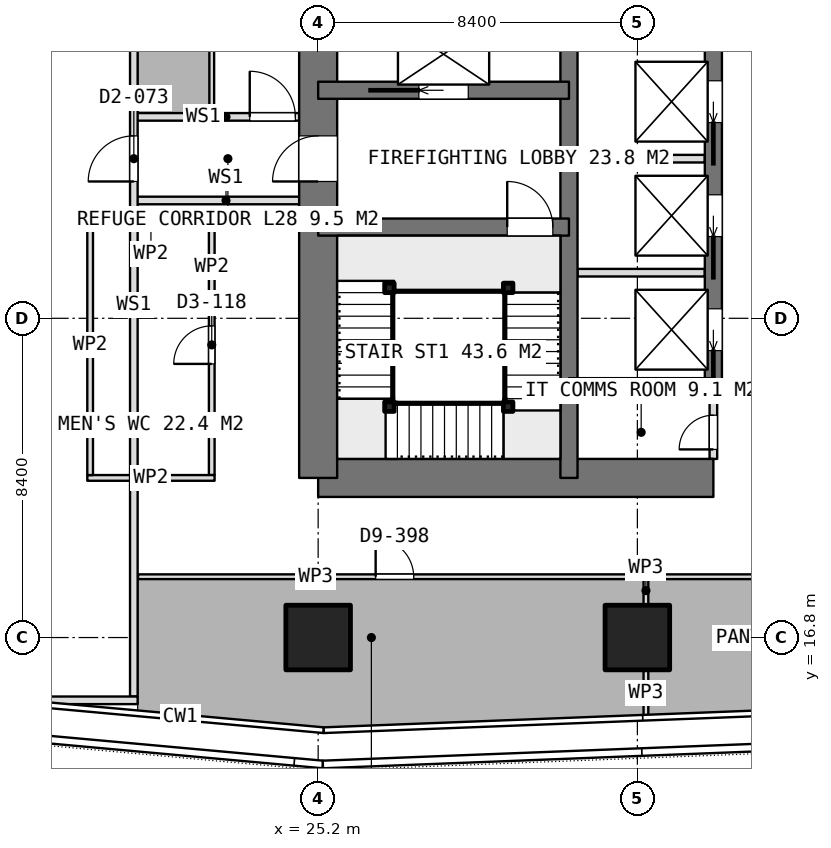
"""IFC4 building model, lengths in metres.
Left out: names, types, materials, properties, quantities, classifications, styles, units other than length and angle.
Written with IfcOpenShell. Run it as: python <this file> out.ifc"""

import sys

from ifc_helpers import new_model, si_unit, direction, frame, frame_2d, origin, origin_2d, place, context, subcontext, project, spatial, rectangle, extrude, element, fill, save


model = new_model("IFC4")
c1 = context("Model", 3, precision=1e-05, world=origin(), true_north=direction((0.0, 1.0)))
c2 = subcontext(c1, "Body", "Model", "MODEL_VIEW")
j1 = project(units=[si_unit("LENGTHUNIT", "METRE"), si_unit("PLANEANGLEUNIT", "RADIAN")], contexts=[c1])
p1 = place(None, origin())
s1 = spatial("IfcSite", under=j1, at=p1, CompositionType="ELEMENT")
p2 = place(p1, origin())
s2 = spatial("IfcBuilding", under=s1, at=p2, CompositionType="ELEMENT")
p3 = place(p2, frame((0.0, 0.0, 114.05)))
s3 = spatial("IfcBuildingStorey", under=s2, at=p3, CompositionType="ELEMENT", Elevation=114.05)
p4 = place(p3, frame((25.2, 21.0, 0.0), z_axis=(0.0, 0.0, 1.0), x_axis=(1.0, 0.0, 0.0)))
e1 = element("IfcWall", 1, at=p4, inside=s3, PredefinedType="SHEAR", context=c2, shape_type="SweptSolid", body=[
    extrude(rectangle(XDim=10.4, YDim=1.0, at=frame_2d((5.2, 0.0))), origin(), (0.0, 0.0, 1.0), 3.75),
])
p5 = place(p3, frame((25.2, 21.0, 0.0), z_axis=(0.0, 0.0, 1.0), x_axis=(0.0, 1.0, 0.0)))
e2 = element("IfcWall", 2, at=p5, inside=s3, PredefinedType="SHEAR", context=c2, shape_type="SweptSolid", body=[
    extrude(rectangle(XDim=25.2, YDim=1.0, at=frame_2d((12.6, 0.0))), origin(), (0.0, 0.0, 1.0), 3.75),
])
p6 = place(p5, frame((7.8, 0.0, 0.0)))
e3 = element("IfcOpeningElement", 3, at=p6, cuts=e2, PredefinedType="OPENING", context=c2, shape_type="SweptSolid", body=[
    extrude(rectangle(XDim=1.2, YDim=2.1, at=frame_2d((0.6, 1.05))), frame((0.0, 0.51, 0.0), z_axis=(0.0, -1.0, 0.0), x_axis=(1.0, 0.0, 0.0)), (0.0, 0.0, 1.0), 1.02),
])
p7 = place(p5, frame((14.25, 0.0, 0.0)))
e4 = element("IfcOpeningElement", 4, at=p7, cuts=e2, PredefinedType="OPENING", context=c2, shape_type="SweptSolid", body=[
    extrude(rectangle(XDim=0.9, YDim=2.1, at=frame_2d((0.45, 1.05))), frame((0.0, 0.51, 0.0), z_axis=(0.0, -1.0, 0.0), x_axis=(1.0, 0.0, 0.0)), (0.0, 0.0, 1.0), 1.02),
])
p8 = place(p5, frame((16.85, 0.0, 0.0)))
e5 = element("IfcOpeningElement", 5, at=p8, cuts=e2, PredefinedType="OPENING", context=c2, shape_type="SweptSolid", body=[
    extrude(rectangle(XDim=0.9, YDim=2.1, at=frame_2d((0.45, 1.05))), frame((0.0, 0.51, 0.0), z_axis=(0.0, -1.0, 0.0), x_axis=(1.0, 0.0, 0.0)), (0.0, 0.0, 1.0), 1.02),
])
p9 = place(p5, frame((19.025, 0.0, 0.0)))
e6 = element("IfcOpeningElement", 6, at=p9, cuts=e2, PredefinedType="OPENING", context=c2, shape_type="SweptSolid", body=[
    extrude(rectangle(XDim=1.2, YDim=2.1, at=frame_2d((0.6, 1.05))), frame((0.0, 0.51, 0.0), z_axis=(0.0, -1.0, 0.0), x_axis=(1.0, 0.0, 0.0)), (0.0, 0.0, 1.0), 1.02),
])
p10 = place(p3, frame((31.8, 21.0, 0.0), z_axis=(0.0, 0.0, 1.0), x_axis=(0.0, 1.0, 0.0)))
e7 = element("IfcWall", 7, at=p10, inside=s3, PredefinedType="SHEAR", context=c2, shape_type="SweptSolid", body=[
    extrude(rectangle(XDim=25.2, YDim=0.45, at=frame_2d((12.6, 0.0))), origin(), (0.0, 0.0, 1.0), 3.75),
])
p11 = place(p3, frame((35.6, 23.4, 0.0), z_axis=(0.0, 0.0, 1.0), x_axis=(0.0, 1.0, 0.0)))
e8 = element("IfcWall", 8, at=p11, inside=s3, PredefinedType="SHEAR", context=c2, shape_type="SweptSolid", body=[
    extrude(rectangle(XDim=18.0, YDim=0.45, at=frame_2d((9.0, 0.0))), origin(), (0.0, 0.0, 1.0), 3.75),
])
p12 = place(p11, frame((0.95, 0.0, 0.0)))
e9 = element("IfcOpeningElement", 9, at=p12, cuts=e8, PredefinedType="OPENING", context=c2, shape_type="SweptSolid", body=[
    extrude(rectangle(XDim=1.1, YDim=2.1, at=frame_2d((0.55, 1.05))), frame((0.0, 0.235, 0.0), z_axis=(0.0, -1.0, 0.0), x_axis=(1.0, 0.0, 0.0)), (0.0, 0.0, 1.0), 0.47),
])
p13 = place(p11, frame((3.95, 0.0, 0.0)))
e10 = element("IfcOpeningElement", 10, at=p13, cuts=e8, PredefinedType="OPENING", context=c2, shape_type="SweptSolid", body=[
    extrude(rectangle(XDim=1.1, YDim=2.1, at=frame_2d((0.55, 1.05))), frame((0.0, 0.235, 0.0), z_axis=(0.0, -1.0, 0.0), x_axis=(1.0, 0.0, 0.0)), (0.0, 0.0, 1.0), 0.47),
])
p14 = place(p11, frame((6.95, 0.0, 0.0)))
e11 = element("IfcOpeningElement", 11, at=p14, cuts=e8, PredefinedType="OPENING", context=c2, shape_type="SweptSolid", body=[
    extrude(rectangle(XDim=1.1, YDim=2.1, at=frame_2d((0.55, 1.05))), frame((0.0, 0.235, 0.0), z_axis=(0.0, -1.0, 0.0), x_axis=(1.0, 0.0, 0.0)), (0.0, 0.0, 1.0), 0.47),
])
p15 = place(p11, frame((9.95, 0.0, 0.0)))
e12 = element("IfcOpeningElement", 12, at=p15, cuts=e8, PredefinedType="OPENING", context=c2, shape_type="SweptSolid", body=[
    extrude(rectangle(XDim=1.1, YDim=2.1, at=frame_2d((0.55, 1.05))), frame((0.0, 0.235, 0.0), z_axis=(0.0, -1.0, 0.0), x_axis=(1.0, 0.0, 0.0)), (0.0, 0.0, 1.0), 0.47),
])
p16 = place(p11, frame((12.95, 0.0, 0.0)))
e13 = element("IfcOpeningElement", 13, at=p16, cuts=e8, PredefinedType="OPENING", context=c2, shape_type="SweptSolid", body=[
    extrude(rectangle(XDim=1.1, YDim=2.1, at=frame_2d((0.55, 1.05))), frame((0.0, 0.235, 0.0), z_axis=(0.0, -1.0, 0.0), x_axis=(1.0, 0.0, 0.0)), (0.0, 0.0, 1.0), 0.47),
])
p17 = place(p11, frame((15.95, 0.0, 0.0)))
e14 = element("IfcOpeningElement", 14, at=p17, cuts=e8, PredefinedType="OPENING", context=c2, shape_type="SweptSolid", body=[
    extrude(rectangle(XDim=1.1, YDim=2.1, at=frame_2d((0.55, 1.05))), frame((0.0, 0.235, 0.0), z_axis=(0.0, -1.0, 0.0), x_axis=(1.0, 0.0, 0.0)), (0.0, 0.0, 1.0), 0.47),
])
p18 = place(p3, frame((31.8, 23.4, 0.0), z_axis=(0.0, 0.0, 1.0), x_axis=(1.0, 0.0, 0.0)))
e15 = element("IfcWall", 15, at=p18, inside=s3, PredefinedType="SHEAR", context=c2, shape_type="SweptSolid", body=[
    extrude(rectangle(XDim=3.8, YDim=0.45, at=frame_2d((1.9, 0.0))), origin(), (0.0, 0.0, 1.0), 3.75),
])
p19 = place(p3, frame((25.2, 27.6, 0.0), z_axis=(0.0, 0.0, 1.0), x_axis=(1.0, 0.0, 0.0)))
e16 = element("IfcWall", 16, at=p19, inside=s3, PredefinedType="SHEAR", context=c2, shape_type="SweptSolid", body=[
    extrude(rectangle(XDim=6.6, YDim=0.45, at=frame_2d((3.3, 0.0))), origin(), (0.0, 0.0, 1.0), 3.75),
])
p20 = place(p19, frame((4.975, 0.0, 0.0)))
e17 = element("IfcOpeningElement", 17, at=p20, cuts=e16, PredefinedType="OPENING", context=c2, shape_type="SweptSolid", body=[
    extrude(rectangle(XDim=1.2, YDim=2.1, at=frame_2d((0.6, 1.05))), frame((0.0, 0.235, 0.0), z_axis=(0.0, -1.0, 0.0), x_axis=(1.0, 0.0, 0.0)), (0.0, 0.0, 1.0), 0.47),
])
p21 = place(p3, frame((25.2, 31.2, 0.0), z_axis=(0.0, 0.0, 1.0), x_axis=(1.0, 0.0, 0.0)))
e18 = element("IfcWall", 18, at=p21, inside=s3, PredefinedType="SHEAR", context=c2, shape_type="SweptSolid", body=[
    extrude(rectangle(XDim=6.6, YDim=0.45, at=frame_2d((3.3, 0.0))), origin(), (0.0, 0.0, 1.0), 3.75),
])
p22 = place(p21, frame((2.65, 0.0, 0.0)))
e19 = element("IfcOpeningElement", 19, at=p22, cuts=e18, PredefinedType="OPENING", context=c2, shape_type="SweptSolid", body=[
    extrude(rectangle(XDim=1.3, YDim=2.1, at=frame_2d((0.65, 1.05))), frame((0.0, 0.235, 0.0), z_axis=(0.0, -1.0, 0.0), x_axis=(1.0, 0.0, 0.0)), (0.0, 0.0, 1.0), 0.47),
])
for number, where, z_axis, x_axis in (
    (20, (25.2, 16.8, 0.0), (0.0, 0.0, 1.0), (1.0, 0.0, 0.0)),
    (21, (33.6, 16.8, 0.0), (0.0, 0.0, 1.0), (1.0, 0.0, 0.0)),
):
    element("IfcColumn", number, at=place(p3, frame(where, z_axis=z_axis, x_axis=x_axis)), inside=s3, PredefinedType="COLUMN", context=c2, shape_type="SweptSolid", body=[
        extrude(rectangle(XDim=1.7, YDim=1.7, at=origin_2d()), origin(), (0.0, 0.0, 1.0), 3.75),
    ])
for number, where, z_axis, x_axis in (
    (22, (32.025, 26.4, 0.0), (0.0, 0.0, 1.0), (1.0, 0.0, 0.0)),
    (23, (32.025, 29.4, 0.0), (0.0, 0.0, 1.0), (1.0, 0.0, 0.0)),
):
    element("IfcWall", number, at=place(p3, frame(where, z_axis=z_axis, x_axis=x_axis)), inside=s3, PredefinedType="PARTITIONING", context=c2, shape_type="SweptSolid", body=[
        extrude(rectangle(XDim=3.35, YDim=0.2, at=frame_2d((1.675, 0.0))), origin(), (0.0, 0.0, 1.0), 3.5),
    ])
p23 = place(p3, frame((35.6, 21.5, 0.0), z_axis=(0.0, 0.0, 1.0), x_axis=(0.0, 1.0, 0.0)))
e24 = element("IfcWall", 24, at=p23, inside=s3, PredefinedType="PARTITIONING", context=c2, shape_type="SweptSolid", body=[
    extrude(rectangle(XDim=1.675, YDim=0.2, at=frame_2d((0.837, 0.0))), origin(), (0.0, 0.0, 1.0), 3.5),
])
p24 = place(p23, frame((0.25, 0.0, 0.0)))
e25 = element("IfcOpeningElement", 25, at=p24, cuts=e24, PredefinedType="OPENING", context=c2, shape_type="SweptSolid", body=[
    extrude(rectangle(XDim=0.9, YDim=2.1, at=frame_2d((0.45, 1.05))), frame((0.0, 0.11, 0.0), z_axis=(0.0, -1.0, 0.0), x_axis=(1.0, 0.0, 0.0)), (0.0, 0.0, 1.0), 0.22),
])
for number, where, z_axis, x_axis in (
    (26, (19.125, 21.0, 0.0), (0.0, 0.0, 1.0), (1.0, 0.0, 0.0)),
    (27, (19.125, 28.0, 0.0), (0.0, 0.0, 1.0), (1.0, 0.0, 0.0)),
):
    element("IfcWall", number, at=place(p3, frame(where, z_axis=z_axis, x_axis=x_axis)), inside=s3, PredefinedType="PARTITIONING", context=c2, shape_type="SweptSolid", body=[
        extrude(rectangle(XDim=3.35, YDim=0.15, at=frame_2d((1.675, 0.0))), origin(), (0.0, 0.0, 1.0), 3.5),
    ])
p25 = place(p3, frame((19.2, 21.075, 0.0), z_axis=(0.0, 0.0, 1.0), x_axis=(0.0, 1.0, 0.0)))
e28 = element("IfcWall", 28, at=p25, inside=s3, PredefinedType="PARTITIONING", context=c2, shape_type="SweptSolid", body=[
    extrude(rectangle(XDim=6.85, YDim=0.15, at=frame_2d((3.425, 0.0))), origin(), (0.0, 0.0, 1.0), 3.5),
])
p26 = place(p3, frame((22.4, 21.075, 0.0), z_axis=(0.0, 0.0, 1.0), x_axis=(0.0, 1.0, 0.0)))
e29 = element("IfcWall", 29, at=p26, inside=s3, PredefinedType="PARTITIONING", context=c2, shape_type="SweptSolid", body=[
    extrude(rectangle(XDim=6.85, YDim=0.15, at=frame_2d((3.425, 0.0))), origin(), (0.0, 0.0, 1.0), 3.5),
])
p27 = place(p26, frame((2.925, 0.0, 0.0)))
e30 = element("IfcOpeningElement", 30, at=p27, cuts=e29, PredefinedType="OPENING", context=c2, shape_type="SweptSolid", body=[
    extrude(rectangle(XDim=1.0, YDim=2.1, at=frame_2d((0.5, 1.05))), frame((0.0, 0.085, 0.0), z_axis=(0.0, -1.0, 0.0), x_axis=(1.0, 0.0, 0.0)), (0.0, 0.0, 1.0), 0.17),
])
p28 = place(p3, frame((22.4, 40.844, 0.0), z_axis=(0.0, 0.0, 1.0), x_axis=(0.0, -1.0, 0.0)))
e31 = element("IfcWall", 31, at=p28, inside=s3, PredefinedType="PARTITIONING", context=c2, shape_type="SweptSolid", body=[
    extrude(rectangle(XDim=10.233, YDim=0.125, at=frame_2d((5.116, 0.0))), origin(), (0.0, 0.0, 1.0), 3.5),
])
p29 = place(p3, frame((20.461, 18.4, 0.0), z_axis=(0.0, 0.0, 1.0), x_axis=(1.0, 0.0, 0.0)))
e32 = element("IfcWall", 32, at=p29, inside=s3, PredefinedType="PARTITIONING", context=c2, shape_type="SweptSolid", body=[
    extrude(rectangle(XDim=13.364, YDim=0.125, at=frame_2d((6.682, 0.0))), origin(), (0.0, 0.0, 1.0), 3.5),
])
p30 = place(p29, frame((6.252, 0.0, 0.0)))
e33 = element("IfcOpeningElement", 33, at=p30, cuts=e32, PredefinedType="OPENING", context=c2, shape_type="SweptSolid", body=[
    extrude(rectangle(XDim=1.0, YDim=2.1, at=frame_2d((0.5, 1.05))), frame((0.0, 0.073, 0.0), z_axis=(0.0, -1.0, 0.0), x_axis=(1.0, 0.0, 0.0)), (0.0, 0.0, 1.0), 0.145),
])
p31 = place(p3, frame((33.825, 18.4, 0.0), z_axis=(0.0, 0.0, 1.0), x_axis=(0.0, -1.0, 0.0)))
e34 = element("IfcWall", 34, at=p31, inside=s3, PredefinedType="PARTITIONING", context=c2, shape_type="SweptSolid", body=[
    extrude(rectangle(XDim=0.73, YDim=0.125, at=frame_2d((0.365, 0.0))), origin(), (0.0, 0.0, 1.0), 3.5),
])
p32 = place(p3, frame((33.825, 15.93, 0.0), z_axis=(0.0, 0.0, 1.0), x_axis=(0.0, -1.0, 0.0)))
e35 = element("IfcWall", 35, at=p32, inside=s3, PredefinedType="PARTITIONING", context=c2, shape_type="SweptSolid", body=[
    extrude(rectangle(XDim=1.188, YDim=0.125, at=frame_2d((0.594, 0.0))), origin(), (0.0, 0.0, 1.0), 3.5),
])
p33 = place(p3, frame((33.826, 18.4, 0.0), z_axis=(0.0, 0.0, 1.0), x_axis=(1.0, 0.0, 0.0)))
e36 = element("IfcWall", 36, at=p33, inside=s3, PredefinedType="PARTITIONING", context=c2, shape_type="SweptSolid", body=[
    extrude(rectangle(XDim=7.914, YDim=0.125, at=frame_2d((3.957, 0.0))), origin(), (0.0, 0.0, 1.0), 3.5),
])
p34 = place(p33, frame((3.457, 0.0, 0.0)))
e37 = element("IfcOpeningElement", 37, at=p34, cuts=e36, PredefinedType="OPENING", context=c2, shape_type="SweptSolid", body=[
    extrude(rectangle(XDim=1.0, YDim=2.1, at=frame_2d((0.5, 1.05))), frame((0.0, 0.073, 0.0), z_axis=(0.0, -1.0, 0.0), x_axis=(1.0, 0.0, 0.0)), (0.0, 0.0, 1.0), 0.145),
])
for number, where, z_axis, x_axis in (
    (38, (30.2, 26.0, 0.0), (0.0, 0.0, 1.0), (1.0, 0.0, 0.0)),
    (39, (30.2, 22.875, 0.0), (0.0, 0.0, 1.0), (1.0, 0.0, 0.0)),
    (40, (27.075, 22.875, 0.0), (0.0, 0.0, 1.0), (1.0, 0.0, 0.0)),
    (41, (27.075, 26.0, 0.0), (0.0, 0.0, 1.0), (1.0, 0.0, 0.0)),
):
    element("IfcColumn", number, at=place(p3, frame(where, z_axis=z_axis, x_axis=x_axis)), inside=s3, PredefinedType="COLUMN", context=c2, shape_type="SweptSolid", body=[
        extrude(rectangle(XDim=0.25, YDim=0.25, at=origin_2d()), origin(), (0.0, 0.0, 1.0), 3.75),
    ])
p35 = place(p3, frame((20.35, 15.248, 0.0), z_axis=(0.0, 0.0, 1.0), x_axis=(0.0, 1.0, 0.0)))
e42 = element("IfcWall", 42, at=p35, inside=s3, PredefinedType="PARTITIONING", context=c2, shape_type="SweptSolid", body=[
    extrude(rectangle(XDim=20.595, YDim=0.2, at=frame_2d((10.297, 0.0))), origin(), (0.0, 0.0, 1.0), 3.5),
])
p36 = place(p35, frame((13.552, 0.0, 0.0)))
e43 = element("IfcOpeningElement", 43, at=p36, cuts=e42, PredefinedType="OPENING", context=c2, shape_type="SweptSolid", body=[
    extrude(rectangle(XDim=1.2, YDim=2.1, at=frame_2d((0.6, 1.05))), frame((0.0, 0.11, 0.0), z_axis=(0.0, -1.0, 0.0), x_axis=(1.0, 0.0, 0.0)), (0.0, 0.0, 1.0), 0.22),
])
p37 = place(p3, frame((6.679, 15.148, 0.0), z_axis=(0.0, 0.0, 1.0), x_axis=(1.0, 0.0, 0.0)))
e44 = element("IfcWall", 44, at=p37, inside=s3, PredefinedType="PARTITIONING", context=c2, shape_type="SweptSolid", body=[
    extrude(rectangle(XDim=13.771, YDim=0.2, at=frame_2d((6.885, 0.0))), origin(), (0.0, 0.0, 1.0), 3.5),
])
p38 = place(p3, frame((20.35, 30.5, 0.0), z_axis=(0.0, 0.0, 1.0), x_axis=(1.0, 0.0, 0.0)))
e45 = element("IfcWall", 45, at=p38, inside=s3, PredefinedType="PARTITIONING", context=c2, shape_type="SweptSolid", body=[
    extrude(rectangle(XDim=4.85, YDim=0.2, at=frame_2d((2.425, 0.0))), origin(), (0.0, 0.0, 1.0), 3.5),
])
p39 = place(p38, frame((3.05, 0.0, 0.0)))
e46 = element("IfcOpeningElement", 46, at=p39, cuts=e45, PredefinedType="OPENING", context=c2, shape_type="SweptSolid", body=[
    extrude(rectangle(XDim=1.2, YDim=2.1, at=frame_2d((0.6, 1.05))), frame((0.0, 0.11, 0.0), z_axis=(0.0, -1.0, 0.0), x_axis=(1.0, 0.0, 0.0)), (0.0, 0.0, 1.0), 0.22),
])
p40 = place(p3, frame((20.35, 28.3, 0.0), z_axis=(0.0, 0.0, 1.0), x_axis=(1.0, 0.0, 0.0)))
e47 = element("IfcWall", 47, at=p40, inside=s3, PredefinedType="PARTITIONING", context=c2, shape_type="SweptSolid", body=[
    extrude(rectangle(XDim=4.85, YDim=0.2, at=frame_2d((2.425, 0.0))), origin(), (0.0, 0.0, 1.0), 3.5),
])
p41 = place(p6, origin())
e48 = element("IfcDoor", 48, at=p41, inside=s3, OperationType="SINGLE_SWING_LEFT", PredefinedType="DOOR", context=c2, shape_type="SweptSolid", body=[
    extrude(rectangle(XDim=1.2, YDim=2.1, at=frame_2d((0.6, 1.05))), frame((0.0, 0.025, 0.0), z_axis=(0.0, -1.0, 0.0), x_axis=(1.0, 0.0, 0.0)), (0.0, 0.0, 1.0), 0.05),
])
fill(e3, e48)
p42 = place(p24, origin())
e49 = element("IfcDoor", 49, at=p42, inside=s3, OperationType="SINGLE_SWING_LEFT", PredefinedType="DOOR", context=c2, shape_type="SweptSolid", body=[
    extrude(rectangle(XDim=0.9, YDim=2.1, at=frame_2d((0.45, 1.05))), frame((0.0, 0.025, 0.0), z_axis=(0.0, -1.0, 0.0), x_axis=(1.0, 0.0, 0.0)), (0.0, 0.0, 1.0), 0.05),
])
fill(e25, e49)
p43 = place(p12, origin())
e50 = element("IfcDoor", 50, at=p43, inside=s3, OperationType="SLIDING_TO_LEFT", PredefinedType="USERDEFINED", context=c2, shape_type="SweptSolid", body=[
    extrude(rectangle(XDim=1.1, YDim=2.1, at=frame_2d((0.55, 1.05))), frame((0.0, 0.025, 0.0), z_axis=(0.0, -1.0, 0.0), x_axis=(1.0, 0.0, 0.0)), (0.0, 0.0, 1.0), 0.05),
])
fill(e9, e50)
p44 = place(p13, origin())
e51 = element("IfcDoor", 51, at=p44, inside=s3, OperationType="SLIDING_TO_LEFT", PredefinedType="USERDEFINED", context=c2, shape_type="SweptSolid", body=[
    extrude(rectangle(XDim=1.1, YDim=2.1, at=frame_2d((0.55, 1.05))), frame((0.0, 0.025, 0.0), z_axis=(0.0, -1.0, 0.0), x_axis=(1.0, 0.0, 0.0)), (0.0, 0.0, 1.0), 0.05),
])
fill(e10, e51)
p45 = place(p14, origin())
e52 = element("IfcDoor", 52, at=p45, inside=s3, OperationType="SLIDING_TO_LEFT", PredefinedType="USERDEFINED", context=c2, shape_type="SweptSolid", body=[
    extrude(rectangle(XDim=1.1, YDim=2.1, at=frame_2d((0.55, 1.05))), frame((0.0, 0.025, 0.0), z_axis=(0.0, -1.0, 0.0), x_axis=(1.0, 0.0, 0.0)), (0.0, 0.0, 1.0), 0.05),
])
fill(e11, e52)
p46 = place(p22, origin())
e53 = element("IfcDoor", 53, at=p46, inside=s3, OperationType="SLIDING_TO_LEFT", PredefinedType="USERDEFINED", context=c2, shape_type="SweptSolid", body=[
    extrude(rectangle(XDim=1.3, YDim=2.1, at=frame_2d((0.65, 1.05))), frame((0.0, 0.025, 0.0), z_axis=(0.0, -1.0, 0.0), x_axis=(1.0, 0.0, 0.0)), (0.0, 0.0, 1.0), 0.05),
])
fill(e19, e53)
p47 = place(p27, origin())
e54 = element("IfcDoor", 54, at=p47, inside=s3, OperationType="SINGLE_SWING_LEFT", PredefinedType="DOOR", context=c2, shape_type="SweptSolid", body=[
    extrude(rectangle(XDim=1.0, YDim=2.1, at=frame_2d((0.5, 1.05))), frame((0.0, 0.025, 0.0), z_axis=(0.0, -1.0, 0.0), x_axis=(1.0, 0.0, 0.0)), (0.0, 0.0, 1.0), 0.05),
])
fill(e30, e54)
p48 = place(p30, origin())
e55 = element("IfcDoor", 55, at=p48, inside=s3, OperationType="SINGLE_SWING_LEFT", PredefinedType="DOOR", context=c2, shape_type="SweptSolid", body=[
    extrude(rectangle(XDim=1.0, YDim=2.1, at=frame_2d((0.5, 1.05))), frame((0.0, 0.025, 0.0), z_axis=(0.0, -1.0, 0.0), x_axis=(1.0, 0.0, 0.0)), (0.0, 0.0, 1.0), 0.05),
])
fill(e33, e55)
p49 = place(p20, origin())
e56 = element("IfcDoor", 56, at=p49, inside=s3, OperationType="SINGLE_SWING_RIGHT", PredefinedType="DOOR", context=c2, shape_type="SweptSolid", body=[
    extrude(rectangle(XDim=1.2, YDim=2.1, at=frame_2d((0.6, 1.05))), frame((0.0, 0.025, 0.0), z_axis=(0.0, -1.0, 0.0), x_axis=(1.0, 0.0, 0.0)), (0.0, 0.0, 1.0), 0.05),
])
fill(e17, e56)
p50 = place(p36, origin())
e57 = element("IfcDoor", 57, at=p50, inside=s3, OperationType="SINGLE_SWING_LEFT", PredefinedType="DOOR", context=c2, shape_type="SweptSolid", body=[
    extrude(rectangle(XDim=1.2, YDim=2.1, at=frame_2d((0.6, 1.05))), frame((0.0, 0.025, 0.0), z_axis=(0.0, -1.0, 0.0), x_axis=(1.0, 0.0, 0.0)), (0.0, 0.0, 1.0), 0.05),
])
fill(e43, e57)
p51 = place(p39, origin())
e58 = element("IfcDoor", 58, at=p51, inside=s3, OperationType="SINGLE_SWING_LEFT", PredefinedType="DOOR", context=c2, shape_type="SweptSolid", body=[
    extrude(rectangle(XDim=1.2, YDim=2.1, at=frame_2d((0.6, 1.05))), frame((0.0, 0.025, 0.0), z_axis=(0.0, -1.0, 0.0), x_axis=(1.0, 0.0, 0.0)), (0.0, 0.0, 1.0), 0.05),
])
fill(e46, e58)
save(model, sys.argv[1])
